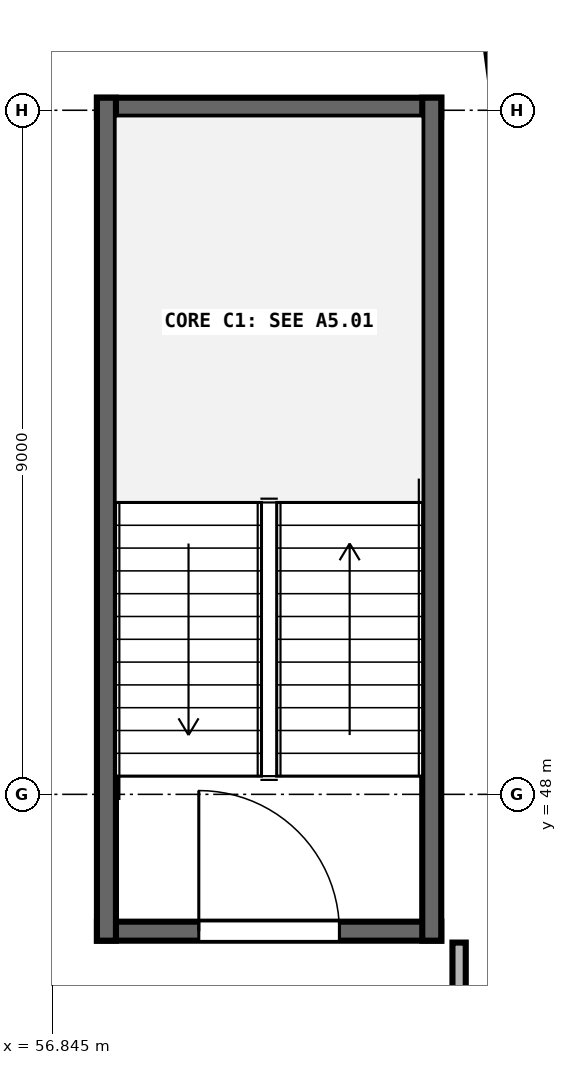
"""IFC4 building model, lengths in metres.
Left out: names, types, materials, properties, quantities, classifications, styles, units other than length and angle.
Written with IfcOpenShell. Run it as: python <this file> out.ifc"""

import sys

from ifc_helpers import new_model, si_unit, direction, frame, frame_2d, origin, place, context, subcontext, project, spatial, rectangle, extrude, element, fill, save


model = new_model("IFC4")
c1 = context("Model", 3, precision=1e-05, world=origin(), true_north=direction((0.0, 1.0)))
c2 = subcontext(c1, "Body", "Model", "MODEL_VIEW")
j1 = project(units=[si_unit("LENGTHUNIT", "METRE"), si_unit("PLANEANGLEUNIT", "RADIAN")], contexts=[c1])
p1 = place(None, origin())
s1 = spatial("IfcSite", under=j1, at=p1, CompositionType="ELEMENT")
p2 = place(p1, origin())
s2 = spatial("IfcBuilding", under=s1, at=p2, CompositionType="ELEMENT")
p3 = place(p2, frame((0.0, 0.0, 14.7)))
s3 = spatial("IfcBuildingStorey", under=s2, at=p3, CompositionType="ELEMENT", Elevation=14.7)
p4 = place(p3, frame((62.4, 60.5, 0.0), z_axis=(0.0, 0.0, 1.0), x_axis=(0.130591512704, -0.99143625958, 0.0)))
e1 = element("IfcWall", 1, at=p4, inside=s3, PredefinedType="SHEAR", context=c2, shape_type="SweptSolid", body=[
    extrude(rectangle(XDim=5.117, YDim=0.4, at=frame_2d((2.558, 0.0))), origin(), (0.0, 0.0, 1.0), 4.25),
])
p5 = place(p3, frame((57.435, 46.2, 0.0), z_axis=(0.0, 0.0, 1.0), x_axis=(1.0, 0.0, 0.0)))
e2 = element("IfcWall", 2, at=p5, inside=s3, PredefinedType="SHEAR", context=c2, shape_type="SweptSolid", body=[
    extrude(rectangle(XDim=4.53, YDim=0.25, at=frame_2d((2.265, 0.0))), origin(), (0.0, 0.0, 1.0), 4.25),
])
p6 = place(p5, frame((1.34, 0.0, 0.0)))
e3 = element("IfcOpeningElement", 3, at=p6, cuts=e2, PredefinedType="OPENING", context=c2, shape_type="SweptSolid", body=[
    extrude(rectangle(XDim=1.85, YDim=2.25, at=frame_2d((0.925, 1.125))), frame((0.0, 0.135, 0.0), z_axis=(0.0, -1.0, 0.0), x_axis=(1.0, 0.0, 0.0)), (0.0, 0.0, 1.0), 0.27),
])
p7 = place(p3, frame((57.435, 57.04, 0.0), z_axis=(0.0, 0.0, 1.0), x_axis=(1.0, 0.0, 0.0)))
e4 = element("IfcWall", 4, at=p7, inside=s3, PredefinedType="SHEAR", context=c2, shape_type="SweptSolid", body=[
    extrude(rectangle(XDim=4.53, YDim=0.25, at=frame_2d((2.265, 0.0))), origin(), (0.0, 0.0, 1.0), 4.25),
])
for number, where, z_axis, x_axis in (
    (5, (57.56, 46.075, 0.0), (0.0, 0.0, 1.0), (0.0, 1.0, 0.0)),
    (6, (61.84, 46.075, 0.0), (0.0, 0.0, 1.0), (0.0, 1.0, 0.0)),
):
    element("IfcWall", number, at=place(p3, frame(where, z_axis=z_axis, x_axis=x_axis)), inside=s3, PredefinedType="SHEAR", context=c2, shape_type="SweptSolid", body=[
        extrude(rectangle(XDim=11.09, YDim=0.25, at=frame_2d((5.545, 0.0))), origin(), (0.0, 0.0, 1.0), 4.25),
    ])
p8 = place(p3, frame((62.2, 40.95, 0.0), z_axis=(0.0, 0.0, 1.0), x_axis=(0.0, 1.0, 0.0)))
e7 = element("IfcWall", 7, at=p8, inside=s3, PredefinedType="PARTITIONING", context=c2, shape_type="SweptSolid", body=[
    extrude(rectangle(XDim=5.1, YDim=0.175, at=frame_2d((2.55, 0.0))), origin(), (0.0, 0.0, 1.0), 4.2),
])
p9 = place(p8, frame((1.775, 0.0, 0.0)))
e8 = element("IfcOpeningElement", 8, at=p9, cuts=e7, PredefinedType="OPENING", context=c2, shape_type="SweptSolid", body=[
    extrude(rectangle(XDim=1.55, YDim=2.22, at=frame_2d((0.775, 1.11))), frame((0.0, 0.097, 0.0), z_axis=(0.0, -1.0, 0.0), x_axis=(1.0, 0.0, 0.0)), (0.0, 0.0, 1.0), 0.195),
])
p10 = place(p6, origin())
e9 = element("IfcDoor", 9, at=p10, inside=s3, OperationType="SINGLE_SWING_LEFT", PredefinedType="DOOR", context=c2, shape_type="SweptSolid", body=[
    extrude(rectangle(XDim=1.85, YDim=2.25, at=frame_2d((0.925, 1.125))), frame((0.0, 0.025, 0.0), z_axis=(0.0, -1.0, 0.0), x_axis=(1.0, 0.0, 0.0)), (0.0, 0.0, 1.0), 0.05),
])
fill(e3, e9)
save(model, sys.argv[1])
